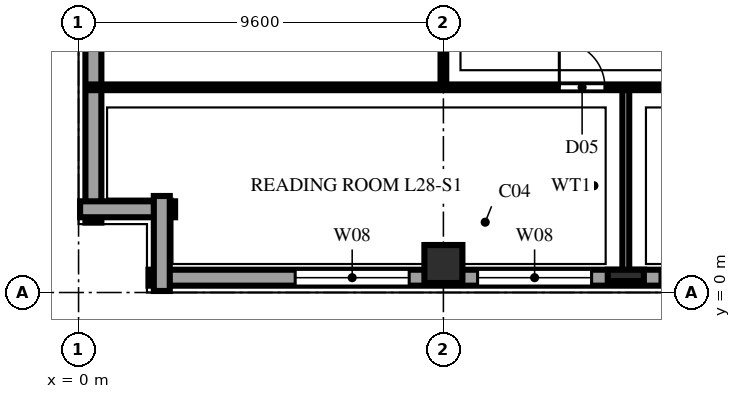
"""IFC4 building model, lengths in metres.
Left out: names, types, materials, properties, quantities, classifications, styles, units other than length and angle.
Written with IfcOpenShell. Run it as: python <this file> out.ifc"""

import sys

from ifc_helpers import new_model, si_unit, direction, frame, frame_2d, origin, origin_2d, place, context, subcontext, project, spatial, rectangle, extrude, element, fill, save


model = new_model("IFC4")
c1 = context("Model", 3, precision=1e-05, world=origin(), true_north=direction((0.0, 1.0)))
c2 = subcontext(c1, "Body", "Model", "MODEL_VIEW")
j1 = project(units=[si_unit("LENGTHUNIT", "METRE"), si_unit("PLANEANGLEUNIT", "RADIAN")], contexts=[c1])
p1 = place(None, origin())
s1 = spatial("IfcSite", under=j1, at=p1, CompositionType="ELEMENT")
p2 = place(p1, origin())
s2 = spatial("IfcBuilding", under=s1, at=p2, CompositionType="ELEMENT")
p3 = place(p2, frame((0.0, 0.0, 112.8)))
s3 = spatial("IfcBuildingStorey", under=s2, at=p3, CompositionType="ELEMENT", Elevation=112.8)
p4 = place(p3, frame((9.6, 0.75, 0.0), z_axis=(0.0, 0.0, 1.0), x_axis=(1.0, 0.0, 0.0)))
e1 = element("IfcColumn", 1, at=p4, inside=s3, PredefinedType="COLUMN", context=c2, shape_type="SweptSolid", body=[
    extrude(rectangle(XDim=1.0, YDim=1.0, at=origin_2d()), origin(), (0.0, 0.0, 1.0), 3.8),
])
p5 = place(p3, frame((14.4, 0.45, 0.0), z_axis=(0.0, 0.0, 1.0), x_axis=(1.0, 0.0, 0.0)))
e2 = element("IfcColumn", 2, at=p5, inside=s3, PredefinedType="PILASTER", context=c2, shape_type="SweptSolid", body=[
    extrude(rectangle(XDim=0.95, YDim=0.3, at=origin_2d()), origin(), (0.0, 0.0, 1.0), 3.8),
])
p6 = place(p3, frame((1.84, 0.39, 0.0), z_axis=(0.0, 0.0, 1.0), x_axis=(1.0, 0.0, 0.0)))
e3 = element("IfcWall", 3, at=p6, inside=s3, PredefinedType="SOLIDWALL", context=c2, shape_type="SweptSolid", body=[
    extrude(rectangle(XDim=53.92, YDim=0.42, at=frame_2d((26.96, 0.0))), origin(), (0.0, 0.0, 1.0), 3.54),
])
p7 = place(p6, frame((3.86, 0.0, 0.75)))
e4 = element("IfcOpeningElement", 4, at=p7, cuts=e3, PredefinedType="OPENING", context=c2, shape_type="SweptSolid", body=[
    extrude(rectangle(XDim=3.0, YDim=1.9, at=frame_2d((1.5, 0.95))), frame((0.0, 0.222, 0.0), z_axis=(0.0, -1.0, 0.0), x_axis=(1.0, 0.0, 0.0)), (0.0, 0.0, 1.0), 0.444),
])
p8 = place(p6, frame((8.66, 0.0, 0.75)))
e5 = element("IfcOpeningElement", 5, at=p8, cuts=e3, PredefinedType="OPENING", context=c2, shape_type="SweptSolid", body=[
    extrude(rectangle(XDim=3.0, YDim=1.9, at=frame_2d((1.5, 0.95))), frame((0.0, 0.222, 0.0), z_axis=(0.0, -1.0, 0.0), x_axis=(1.0, 0.0, 0.0)), (0.0, 0.0, 1.0), 0.444),
])
p9 = place(p6, frame((13.46, 0.0, 0.75)))
e6 = element("IfcOpeningElement", 6, at=p9, cuts=e3, PredefinedType="OPENING", context=c2, shape_type="SweptSolid", body=[
    extrude(rectangle(XDim=3.0, YDim=1.9, at=frame_2d((1.5, 0.95))), frame((0.0, 0.222, 0.0), z_axis=(0.0, -1.0, 0.0), x_axis=(1.0, 0.0, 0.0)), (0.0, 0.0, 1.0), 0.444),
])
p10 = place(p6, frame((18.26, 0.0, 0.75)))
e7 = element("IfcOpeningElement", 7, at=p10, cuts=e3, PredefinedType="OPENING", context=c2, shape_type="SweptSolid", body=[
    extrude(rectangle(XDim=3.0, YDim=1.9, at=frame_2d((1.5, 0.95))), frame((0.0, 0.222, 0.0), z_axis=(0.0, -1.0, 0.0), x_axis=(1.0, 0.0, 0.0)), (0.0, 0.0, 1.0), 0.444),
])
p11 = place(p3, frame((0.39, 65.36, 0.0), z_axis=(0.0, 0.0, 1.0), x_axis=(0.0, -1.0, 0.0)))
e8 = element("IfcWall", 8, at=p11, inside=s3, PredefinedType="SOLIDWALL", context=c2, shape_type="SweptSolid", body=[
    extrude(rectangle(XDim=63.52, YDim=0.42, at=frame_2d((31.76, 0.0))), origin(), (0.0, 0.0, 1.0), 3.54),
])
p12 = place(p11, frame((4.885, 0.0, 0.9)))
e9 = element("IfcOpeningElement", 9, at=p12, cuts=e8, PredefinedType="OPENING", context=c2, shape_type="SweptSolid", body=[
    extrude(rectangle(XDim=0.95, YDim=1.85, at=frame_2d((0.475, 0.925))), frame((0.0, 0.222, 0.0), z_axis=(0.0, -1.0, 0.0), x_axis=(1.0, 0.0, 0.0)), (0.0, 0.0, 1.0), 0.444),
])
p13 = place(p11, frame((9.41, 0.0, 0.9)))
e10 = element("IfcOpeningElement", 10, at=p13, cuts=e8, PredefinedType="OPENING", context=c2, shape_type="SweptSolid", body=[
    extrude(rectangle(XDim=1.5, YDim=1.85, at=frame_2d((0.75, 0.925))), frame((0.0, 0.222, 0.0), z_axis=(0.0, -1.0, 0.0), x_axis=(1.0, 0.0, 0.0)), (0.0, 0.0, 1.0), 0.444),
])
p14 = place(p11, frame((14.485, 0.0, 0.9)))
e11 = element("IfcOpeningElement", 11, at=p14, cuts=e8, PredefinedType="OPENING", context=c2, shape_type="SweptSolid", body=[
    extrude(rectangle(XDim=0.95, YDim=1.85, at=frame_2d((0.475, 0.925))), frame((0.0, 0.222, 0.0), z_axis=(0.0, -1.0, 0.0), x_axis=(1.0, 0.0, 0.0)), (0.0, 0.0, 1.0), 0.444),
])
p15 = place(p11, frame((19.01, 0.0, 0.9)))
e12 = element("IfcOpeningElement", 12, at=p15, cuts=e8, PredefinedType="OPENING", context=c2, shape_type="SweptSolid", body=[
    extrude(rectangle(XDim=1.5, YDim=1.85, at=frame_2d((0.75, 0.925))), frame((0.0, 0.222, 0.0), z_axis=(0.0, -1.0, 0.0), x_axis=(1.0, 0.0, 0.0)), (0.0, 0.0, 1.0), 0.444),
])
p16 = place(p11, frame((24.085, 0.0, 0.9)))
e13 = element("IfcOpeningElement", 13, at=p16, cuts=e8, PredefinedType="OPENING", context=c2, shape_type="SweptSolid", body=[
    extrude(rectangle(XDim=0.95, YDim=1.85, at=frame_2d((0.475, 0.925))), frame((0.0, 0.222, 0.0), z_axis=(0.0, -1.0, 0.0), x_axis=(1.0, 0.0, 0.0)), (0.0, 0.0, 1.0), 0.444),
])
p17 = place(p11, frame((28.61, 0.0, 0.9)))
e14 = element("IfcOpeningElement", 14, at=p17, cuts=e8, PredefinedType="OPENING", context=c2, shape_type="SweptSolid", body=[
    extrude(rectangle(XDim=1.5, YDim=1.85, at=frame_2d((0.75, 0.925))), frame((0.0, 0.222, 0.0), z_axis=(0.0, -1.0, 0.0), x_axis=(1.0, 0.0, 0.0)), (0.0, 0.0, 1.0), 0.444),
])
p18 = place(p11, frame((33.685, 0.0, 0.9)))
e15 = element("IfcOpeningElement", 15, at=p18, cuts=e8, PredefinedType="OPENING", context=c2, shape_type="SweptSolid", body=[
    extrude(rectangle(XDim=0.95, YDim=1.85, at=frame_2d((0.475, 0.925))), frame((0.0, 0.222, 0.0), z_axis=(0.0, -1.0, 0.0), x_axis=(1.0, 0.0, 0.0)), (0.0, 0.0, 1.0), 0.444),
])
p19 = place(p11, frame((38.21, 0.0, 0.9)))
e16 = element("IfcOpeningElement", 16, at=p19, cuts=e8, PredefinedType="OPENING", context=c2, shape_type="SweptSolid", body=[
    extrude(rectangle(XDim=1.5, YDim=1.85, at=frame_2d((0.75, 0.925))), frame((0.0, 0.222, 0.0), z_axis=(0.0, -1.0, 0.0), x_axis=(1.0, 0.0, 0.0)), (0.0, 0.0, 1.0), 0.444),
])
p20 = place(p11, frame((43.285, 0.0, 0.9)))
e17 = element("IfcOpeningElement", 17, at=p20, cuts=e8, PredefinedType="OPENING", context=c2, shape_type="SweptSolid", body=[
    extrude(rectangle(XDim=0.95, YDim=1.85, at=frame_2d((0.475, 0.925))), frame((0.0, 0.222, 0.0), z_axis=(0.0, -1.0, 0.0), x_axis=(1.0, 0.0, 0.0)), (0.0, 0.0, 1.0), 0.444),
])
p21 = place(p11, frame((47.81, 0.0, 0.9)))
e18 = element("IfcOpeningElement", 18, at=p21, cuts=e8, PredefinedType="OPENING", context=c2, shape_type="SweptSolid", body=[
    extrude(rectangle(XDim=1.5, YDim=1.85, at=frame_2d((0.75, 0.925))), frame((0.0, 0.222, 0.0), z_axis=(0.0, -1.0, 0.0), x_axis=(1.0, 0.0, 0.0)), (0.0, 0.0, 1.0), 0.444),
])
p22 = place(p11, frame((52.885, 0.0, 0.9)))
e19 = element("IfcOpeningElement", 19, at=p22, cuts=e8, PredefinedType="OPENING", context=c2, shape_type="SweptSolid", body=[
    extrude(rectangle(XDim=0.95, YDim=1.85, at=frame_2d((0.475, 0.925))), frame((0.0, 0.222, 0.0), z_axis=(0.0, -1.0, 0.0), x_axis=(1.0, 0.0, 0.0)), (0.0, 0.0, 1.0), 0.444),
])
p23 = place(p11, frame((57.41, 0.0, 0.9)))
e20 = element("IfcOpeningElement", 20, at=p23, cuts=e8, PredefinedType="OPENING", context=c2, shape_type="SweptSolid", body=[
    extrude(rectangle(XDim=1.5, YDim=1.85, at=frame_2d((0.75, 0.925))), frame((0.0, 0.222, 0.0), z_axis=(0.0, -1.0, 0.0), x_axis=(1.0, 0.0, 0.0)), (0.0, 0.0, 1.0), 0.444),
])
for number, where, z_axis, x_axis in (
    (21, (0.04, 2.19, 0.0), (0.0, 0.0, 1.0), (1.0, 0.0, 0.0)),
    (22, (2.19, 2.54, 0.0), (0.0, 0.0, 1.0), (0.0, -1.0, 0.0)),
):
    element("IfcWall", number, at=place(p3, frame(where, z_axis=z_axis, x_axis=x_axis)), inside=s3, PredefinedType="SOLIDWALL", context=c2, shape_type="SweptSolid", body=[
        extrude(rectangle(XDim=2.5, YDim=0.42, at=frame_2d((1.25, 0.0))), origin(), (0.0, 0.0, 1.0), 3.54),
    ])
p24 = place(p3, frame((9.6, 5.4, 0.0), z_axis=(0.0, 0.0, 1.0), x_axis=(0.0, 1.0, 0.0)))
e23 = element("IfcWall", 23, at=p24, inside=s3, PredefinedType="PARTITIONING", context=c2, shape_type="SweptSolid", body=[
    extrude(rectangle(XDim=4.2, YDim=0.15, at=frame_2d((2.1, 0.0))), origin(), (0.0, 0.0, 1.0), 2.845),
])
p25 = place(p3, frame((14.4, 0.22, 0.0), z_axis=(0.0, 0.0, 1.0), x_axis=(0.0, 1.0, 0.0)))
e24 = element("IfcWall", 24, at=p25, inside=s3, PredefinedType="PARTITIONING", context=c2, shape_type="SweptSolid", body=[
    extrude(rectangle(XDim=5.18, YDim=0.18, at=frame_2d((2.59, 0.0))), origin(), (0.0, 0.0, 1.0), 3.54),
])
p26 = place(p3, frame((0.22, 5.4, 0.0), z_axis=(0.0, 0.0, 1.0), x_axis=(1.0, 0.0, 0.0)))
e25 = element("IfcWall", 25, at=p26, inside=s3, PredefinedType="PARTITIONING", context=c2, shape_type="SweptSolid", body=[
    extrude(rectangle(XDim=47.78, YDim=0.15, at=frame_2d((23.89, 0.0))), origin(), (0.0, 0.0, 1.0), 3.54),
])
p27 = place(p26, frame((12.43, 0.0, 0.0)))
e26 = element("IfcOpeningElement", 26, at=p27, cuts=e25, PredefinedType="OPENING", context=c2, shape_type="SweptSolid", body=[
    extrude(rectangle(XDim=1.2, YDim=2.2, at=frame_2d((0.6, 1.1))), frame((0.0, 0.087, 0.0), z_axis=(0.0, -1.0, 0.0), x_axis=(1.0, 0.0, 0.0)), (0.0, 0.0, 1.0), 0.174),
])
p28 = place(p26, frame((23.23, 0.0, 0.0)))
e27 = element("IfcOpeningElement", 27, at=p28, cuts=e25, PredefinedType="OPENING", context=c2, shape_type="SweptSolid", body=[
    extrude(rectangle(XDim=1.2, YDim=2.2, at=frame_2d((0.6, 1.1))), frame((0.0, 0.087, 0.0), z_axis=(0.0, -1.0, 0.0), x_axis=(1.0, 0.0, 0.0)), (0.0, 0.0, 1.0), 0.174),
])
p29 = place(p26, frame((31.98, 0.0, 0.0)))
e28 = element("IfcOpeningElement", 28, at=p29, cuts=e25, PredefinedType="OPENING", context=c2, shape_type="SweptSolid", body=[
    extrude(rectangle(XDim=2.0, YDim=2.3, at=frame_2d((1.0, 1.15))), frame((0.0, 0.087, 0.0), z_axis=(0.0, -1.0, 0.0), x_axis=(1.0, 0.0, 0.0)), (0.0, 0.0, 1.0), 0.174),
])
p30 = place(p26, frame((41.73, 0.0, 0.0)))
e29 = element("IfcOpeningElement", 29, at=p30, cuts=e25, PredefinedType="OPENING", context=c2, shape_type="SweptSolid", body=[
    extrude(rectangle(XDim=1.2, YDim=2.2, at=frame_2d((0.6, 1.1))), frame((0.0, 0.087, 0.0), z_axis=(0.0, -1.0, 0.0), x_axis=(1.0, 0.0, 0.0)), (0.0, 0.0, 1.0), 0.174),
])
p31 = place(p7, origin())
e30 = element("IfcWindow", 30, at=p31, inside=s3, PartitioningType="TRIPLE_PANEL_VERTICAL", PredefinedType="WINDOW", context=c2, shape_type="SweptSolid", body=[
    extrude(rectangle(XDim=3.0, YDim=1.9, at=frame_2d((1.5, 0.95))), frame((0.0, 0.11, 0.0), z_axis=(0.0, -1.0, 0.0), x_axis=(1.0, 0.0, 0.0)), (0.0, 0.0, 1.0), 0.06),
])
fill(e4, e30)
p32 = place(p8, origin())
e31 = element("IfcWindow", 31, at=p32, inside=s3, PartitioningType="TRIPLE_PANEL_VERTICAL", PredefinedType="WINDOW", context=c2, shape_type="SweptSolid", body=[
    extrude(rectangle(XDim=3.0, YDim=1.9, at=frame_2d((1.5, 0.95))), frame((0.0, 0.11, 0.0), z_axis=(0.0, -1.0, 0.0), x_axis=(1.0, 0.0, 0.0)), (0.0, 0.0, 1.0), 0.06),
])
fill(e5, e31)
p33 = place(p9, origin())
e32 = element("IfcWindow", 32, at=p33, inside=s3, PartitioningType="TRIPLE_PANEL_VERTICAL", PredefinedType="WINDOW", context=c2, shape_type="SweptSolid", body=[
    extrude(rectangle(XDim=3.0, YDim=1.9, at=frame_2d((1.5, 0.95))), frame((0.0, 0.11, 0.0), z_axis=(0.0, -1.0, 0.0), x_axis=(1.0, 0.0, 0.0)), (0.0, 0.0, 1.0), 0.06),
])
fill(e6, e32)
p34 = place(p27, origin())
e33 = element("IfcDoor", 33, at=p34, inside=s3, OperationType="SINGLE_SWING_LEFT", PredefinedType="DOOR", context=c2, shape_type="SweptSolid", body=[
    extrude(rectangle(XDim=1.2, YDim=2.2, at=frame_2d((0.6, 1.1))), frame((0.0, 0.025, 0.0), z_axis=(0.0, -1.0, 0.0), x_axis=(1.0, 0.0, 0.0)), (0.0, 0.0, 1.0), 0.05),
])
fill(e26, e33)
save(model, sys.argv[1])
